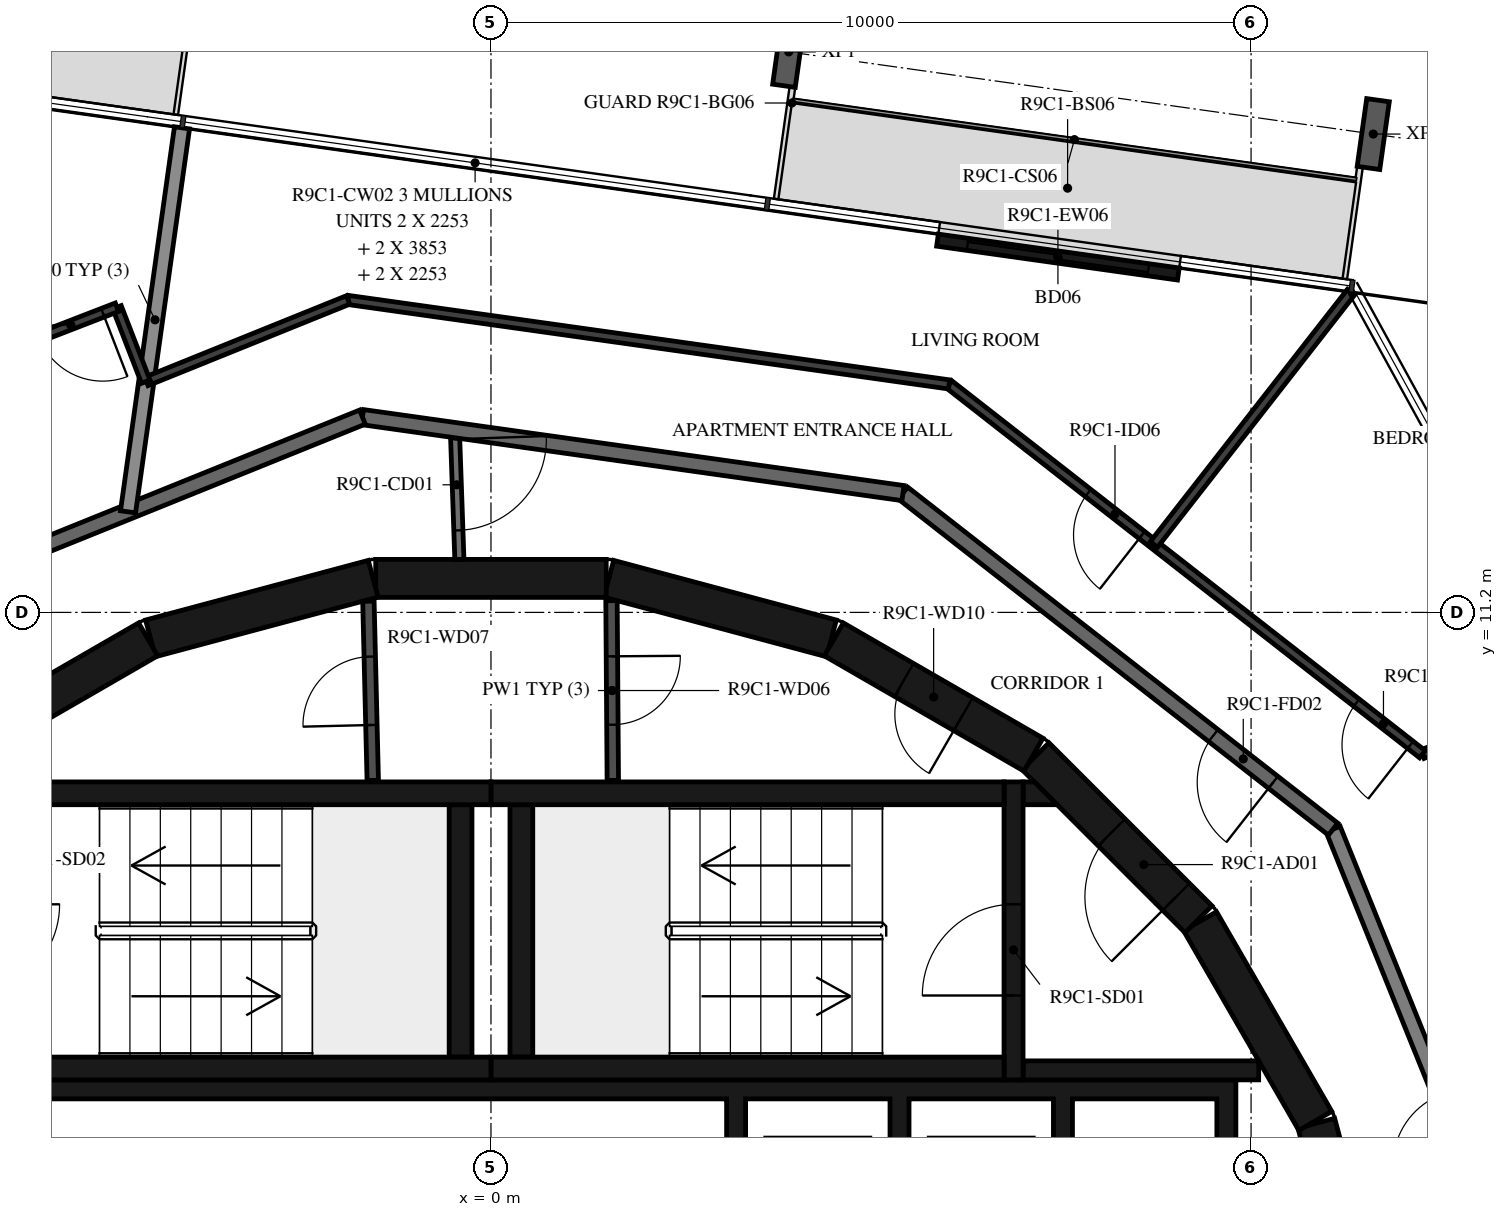
"""IFC4 building model, lengths in metres.
Left out: names, types, materials, properties, quantities, classifications, styles, units other than length and angle.
Written with IfcOpenShell. Run it as: python <this file> out.ifc"""

import sys

from ifc_helpers import new_model, si_unit, direction, frame, frame_2d, origin, origin_2d, place, context, subcontext, project, spatial, polyline, rectangle, i_section, outline, extrude, element, fill, save


model = new_model("IFC4")
c1 = context("Model", 3, precision=1e-05, world=origin(), true_north=direction((0.0, 1.0)))
c2 = subcontext(c1, "Body", "Model", "MODEL_VIEW")
j1 = project(units=[si_unit("LENGTHUNIT", "METRE"), si_unit("PLANEANGLEUNIT", "RADIAN")], contexts=[c1])
p1 = place(None, origin())
s1 = spatial("IfcSite", under=j1, at=p1, CompositionType="ELEMENT")
p2 = place(p1, origin())
s2 = spatial("IfcBuilding", under=s1, at=p2, CompositionType="ELEMENT")
p3 = place(p2, frame((0.0, 0.0, 357.5)))
s3 = spatial("IfcBuildingStorey", under=s2, at=p3, CompositionType="ELEMENT", Elevation=357.5)
for number, where, z_axis, x_axis in (
    (1, (11.607, 17.493, -0.38), (0.0, 0.0, 1.0), (0.99, -0.139, 0.0)),
    (2, (3.917, 18.574, -0.38), (0.0, 0.0, 1.0), (0.99, -0.139, 0.0)),
):
    element("IfcColumn", number, at=place(p3, frame(where, z_axis=z_axis, x_axis=x_axis)), inside=s3, PredefinedType="COLUMN", context=c2, shape_type="SweptSolid", body=[
        extrude(i_section(OverallWidth=0.3, OverallDepth=0.9, WebThickness=0.019, FlangeThickness=0.035, FilletRadius=0.03, at=origin_2d()), origin(), (0.0, 0.0, 1.0), 3.5),
    ])
p4 = place(p3, frame((9.043, 15.652, 0.0), z_axis=(0.0, 0.0, 1.0), x_axis=(-0.990270382149, 0.139156639217, 0.0)))
e3 = element("IfcWall", 3, at=p4, inside=s3, PredefinedType="STANDARD", context=c2, shape_type="SweptSolid", body=[
    extrude(rectangle(XDim=3.2, YDim=0.16, at=frame_2d((1.6, 0.0))), origin(), (0.0, 0.0, 1.0), 3.12),
])
p5 = place(p4, frame((0.4, 0.0, 0.0)))
e4 = element("IfcOpeningElement", 4, at=p5, cuts=e3, PredefinedType="OPENING", context=c2, shape_type="SweptSolid", body=[
    extrude(rectangle(XDim=2.4, YDim=2.4, at=frame_2d((1.2, 1.2))), frame((0.0, 0.09, 0.0), z_axis=(0.0, -1.0, 0.0), x_axis=(1.0, 0.0, 0.0)), (0.0, 0.0, 1.0), 0.18),
])
for number, where, z_axis, x_axis in (
    (5, (11.643, 1.55, 0.0), (0.0, 0.0, 1.0), (-0.259, 0.966, 0.0)),
    (6, (10.845, 4.51, 0.0), (0.0, 0.0, 1.0), (-0.5, 0.866, 0.0)),
):
    element("IfcWall", number, at=place(p3, frame(where, z_axis=z_axis, x_axis=x_axis)), inside=s3, PredefinedType="SHEAR", context=c2, shape_type="SweptSolid", body=[
        extrude(rectangle(XDim=3.033, YDim=0.5, at=frame_2d((1.516, 0.0))), origin(), (0.0, 0.0, 1.0), 3.12),
    ])
p6 = place(p3, frame((9.308, 7.164, 0.0), z_axis=(0.0, 0.0, 1.0), x_axis=(-0.707106781187, 0.707106781187, 0.0)))
e7 = element("IfcWall", 7, at=p6, inside=s3, PredefinedType="SHEAR", context=c2, shape_type="SweptSolid", body=[
    extrude(rectangle(XDim=3.032, YDim=0.5, at=frame_2d((1.516, 0.0))), origin(), (0.0, 0.0, 1.0), 3.12),
])
p7 = place(p6, frame((0.416, 0.0, 0.0)))
e8 = element("IfcOpeningElement", 8, at=p7, cuts=e7, PredefinedType="OPENING", context=c2, shape_type="SweptSolid", body=[
    extrude(rectangle(XDim=1.2, YDim=2.1, at=frame_2d((0.6, 1.05))), frame((0.0, 0.26, 0.0), z_axis=(0.0, -1.0, 0.0), x_axis=(1.0, 0.0, 0.0)), (0.0, 0.0, 1.0), 0.52),
])
p8 = place(p3, frame((7.137, 9.329, 0.0), z_axis=(0.0, 0.0, 1.0), x_axis=(-0.865975092491, 0.500087131594, 0.0)))
e9 = element("IfcWall", 9, at=p8, inside=s3, PredefinedType="SHEAR", context=c2, shape_type="SweptSolid", body=[
    extrude(rectangle(XDim=3.033, YDim=0.5, at=frame_2d((1.516, 0.0))), origin(), (0.0, 0.0, 1.0), 3.12),
])
p9 = place(p8, frame((1.066, 0.0, 0.0)))
e10 = element("IfcOpeningElement", 10, at=p9, cuts=e9, PredefinedType="OPENING", context=c2, shape_type="SweptSolid", body=[
    extrude(rectangle(XDim=0.9, YDim=2.1, at=frame_2d((0.45, 1.05))), frame((0.0, 0.26, 0.0), z_axis=(0.0, -1.0, 0.0), x_axis=(1.0, 0.0, 0.0)), (0.0, 0.0, 1.0), 0.52),
])
for number, where, z_axis, x_axis in (
    (11, (4.479, 10.858, 0.0), (0.0, 0.0, 1.0), (-0.966, 0.259, 0.0)),
    (12, (1.516, 11.647, 0.0), (0.0, 0.0, 1.0), (-1.0, 0.0, 0.0)),
    (13, (-1.55, 11.643, 0.0), (0.0, 0.0, 1.0), (-0.966, -0.259, 0.0)),
    (14, (-4.51, 10.845, 0.0), (0.0, 0.0, 1.0), (-0.866, -0.5, 0.0)),
):
    element("IfcWall", number, at=place(p3, frame(where, z_axis=z_axis, x_axis=x_axis)), inside=s3, PredefinedType="SHEAR", context=c2, shape_type="SweptSolid", body=[
        extrude(rectangle(XDim=3.033, YDim=0.5, at=frame_2d((1.516, 0.0))), origin(), (0.0, 0.0, 1.0), 3.12),
    ])
for number, where, z_axis, x_axis in (
    (15, (0.0, 5.2, 0.0), (0.0, 0.0, 1.0), (1.0, 0.0, 0.0)),
    (16, (0.0, 8.82, 0.0), (0.0, 0.0, 1.0), (1.0, 0.0, 0.0)),
):
    element("IfcWall", number, at=place(p3, frame(where, z_axis=z_axis, x_axis=x_axis)), inside=s3, PredefinedType="SHEAR", context=c2, shape_type="SweptSolid", body=[
        extrude(rectangle(XDim=6.75, YDim=0.3, at=frame_2d((3.375, 0.0))), origin(), (0.0, 0.0, 1.0), 3.12),
    ])
p10 = place(p3, frame((0.4, 5.35, 0.0), z_axis=(0.0, 0.0, 1.0), x_axis=(0.0, 1.0, 0.0)))
e17 = element("IfcWall", 17, at=p10, inside=s3, PredefinedType="SHEAR", context=c2, shape_type="SweptSolid", body=[
    extrude(rectangle(XDim=3.32, YDim=0.3, at=frame_2d((1.66, 0.0))), origin(), (0.0, 0.0, 1.0), 3.12),
])
p11 = place(p3, frame((6.875, 5.05, 0.0), z_axis=(0.0, 0.0, 1.0), x_axis=(0.0, 1.0, 0.0)))
e18 = element("IfcWall", 18, at=p11, inside=s3, PredefinedType="SHEAR", context=c2, shape_type="SweptSolid", body=[
    extrude(rectangle(XDim=3.92, YDim=0.25, at=frame_2d((1.96, 0.0))), origin(), (0.0, 0.0, 1.0), 3.12),
])
p12 = place(p11, frame((1.11, 0.0, 0.0)))
e19 = element("IfcOpeningElement", 19, at=p12, cuts=e18, PredefinedType="OPENING", context=c2, shape_type="SweptSolid", body=[
    extrude(rectangle(XDim=1.2, YDim=2.1, at=frame_2d((0.6, 1.05))), frame((0.0, 0.135, 0.0), z_axis=(0.0, -1.0, 0.0), x_axis=(1.0, 0.0, 0.0)), (0.0, 0.0, 1.0), 0.27),
])
p13 = place(p3, frame((7.0, 5.175, 0.0), z_axis=(0.0, 0.0, 1.0), x_axis=(1.0, 0.0, 0.0)))
e20 = element("IfcWall", 20, at=p13, inside=s3, PredefinedType="SHEAR", context=c2, shape_type="SweptSolid", body=[
    extrude(rectangle(XDim=3.1, YDim=0.25, at=frame_2d((1.55, 0.0))), origin(), (0.0, 0.0, 1.0), 3.12),
])
p14 = place(p3, origin())
e21 = element("IfcWall", 21, at=p14, inside=s3, PredefinedType="SHEAR", context=c2, shape_type="SweptSolid", body=[
    extrude(outline(polyline([(7.448, 8.67), (7.0, 8.67), (7.0, 8.97), (7.148, 8.97), (7.448, 8.67)])), origin(), (0.0, 0.0, 1.0), 3.12),
])
for number, where, z_axis, x_axis in (
    (22, (-6.75, 5.2, 0.0), (0.0, 0.0, 1.0), (1.0, 0.0, 0.0)),
    (23, (-6.75, 8.82, 0.0), (0.0, 0.0, 1.0), (1.0, 0.0, 0.0)),
):
    element("IfcWall", number, at=place(p3, frame(where, z_axis=z_axis, x_axis=x_axis)), inside=s3, PredefinedType="SHEAR", context=c2, shape_type="SweptSolid", body=[
        extrude(rectangle(XDim=6.75, YDim=0.3, at=frame_2d((3.375, 0.0))), origin(), (0.0, 0.0, 1.0), 3.12),
    ])
p15 = place(p3, frame((-0.4, 5.35, 0.0), z_axis=(0.0, 0.0, 1.0), x_axis=(0.0, 1.0, 0.0)))
e24 = element("IfcWall", 24, at=p15, inside=s3, PredefinedType="SHEAR", context=c2, shape_type="SweptSolid", body=[
    extrude(rectangle(XDim=3.32, YDim=0.3, at=frame_2d((1.66, 0.0))), origin(), (0.0, 0.0, 1.0), 3.12),
])
p16 = place(p3, origin())
e25 = element("IfcWall", 25, at=p16, inside=s3, PredefinedType="SHEAR", context=c2, shape_type="SweptSolid", body=[
    extrude(outline(polyline([(-9.8, 1.9), (-9.55, 1.9), (-9.55, 4.8), (3.1, 4.8), (3.1, 1.9), (3.35, 1.9), (3.35, 4.8), (5.25, 4.8), (5.25, 1.9), (5.5, 1.9), (5.5, 4.8), (7.4, 4.8), (7.4, 1.9), (7.65, 1.9), (7.65, 4.8), (9.55, 4.8), (9.55, 1.9), (9.8, 1.9), (9.8, 4.8), (9.8, 5.05), (-9.8, 5.05), (-9.8, 4.8), (-9.8, 1.9)])), origin(), (0.0, 0.0, 1.0), 3.12),
])
p17 = place(p3, frame((1.586, 11.354, 0.0), z_axis=(0.0, 0.0, 1.0), x_axis=(0.007227482881, -0.999973881405, 0.0)))
e26 = element("IfcWall", 26, at=p17, inside=s3, PredefinedType="PARTITIONING", context=c2, shape_type="SweptSolid", body=[
    extrude(rectangle(XDim=2.365, YDim=0.15, at=frame_2d((1.182, 0.0))), origin(), (0.0, 0.0, 1.0), 3.12),
])
p18 = place(p17, frame((0.732, 0.0, 0.0)))
e27 = element("IfcOpeningElement", 27, at=p18, cuts=e26, PredefinedType="OPENING", context=c2, shape_type="SweptSolid", body=[
    extrude(rectangle(XDim=0.9, YDim=2.1, at=frame_2d((0.45, 1.05))), frame((0.0, 0.085, 0.0), z_axis=(0.0, -1.0, 0.0), x_axis=(1.0, 0.0, 0.0)), (0.0, 0.0, 1.0), 0.17),
])
p19 = place(p3, frame((-1.555, 8.99, 0.0), z_axis=(0.0, 0.0, 1.0), x_axis=(-0.024125549686, 0.999708936567, 0.0)))
e28 = element("IfcWall", 28, at=p19, inside=s3, PredefinedType="PARTITIONING", context=c2, shape_type="SweptSolid", body=[
    extrude(rectangle(XDim=2.358, YDim=0.15, at=frame_2d((1.179, 0.0))), origin(), (0.0, 0.0, 1.0), 3.12),
])
p20 = place(p19, frame((0.729, 0.0, 0.0)))
e29 = element("IfcOpeningElement", 29, at=p20, cuts=e28, PredefinedType="OPENING", context=c2, shape_type="SweptSolid", body=[
    extrude(rectangle(XDim=0.9, YDim=2.1, at=frame_2d((0.45, 1.05))), frame((0.0, 0.085, 0.0), z_axis=(0.0, -1.0, 0.0), x_axis=(1.0, 0.0, 0.0)), (0.0, 0.0, 1.0), 0.17),
])
p21 = place(p3, frame((-0.475, 13.598, 0.0), z_axis=(0.0, 0.0, 1.0), x_axis=(0.034852521429, -0.999392466326, 0.0)))
e30 = element("IfcWall", 30, at=p21, inside=s3, PredefinedType="PARTITIONING", context=c2, shape_type="SweptSolid", body=[
    extrude(rectangle(XDim=1.702, YDim=0.12, at=frame_2d((0.851, 0.0))), origin(), (0.0, 0.0, 1.0), 3.12),
])
p22 = place(p21, frame((0.12, 0.0, 0.0)))
e31 = element("IfcOpeningElement", 31, at=p22, cuts=e30, PredefinedType="OPENING", context=c2, shape_type="SweptSolid", body=[
    extrude(rectangle(XDim=1.2, YDim=2.1, at=frame_2d((0.6, 1.05))), frame((0.0, 0.07, 0.0), z_axis=(0.0, -1.0, 0.0), x_axis=(1.0, 0.0, 0.0)), (0.0, 0.0, 1.0), 0.14),
])
p23 = place(p3, frame((13.769, 1.691, 0.0), z_axis=(0.0, 0.0, 1.0), x_axis=(-0.374618189599, 0.92717916932, 0.0)))
e32 = element("IfcWall", 32, at=p23, inside=s3, PredefinedType="STANDARD", context=c2, shape_type="SweptSolid", body=[
    extrude(rectangle(XDim=7.181, YDim=0.2, at=frame_2d((3.591, 0.0))), origin(), (0.0, 0.0, 1.0), 3.12),
])
p24 = place(p23, frame((2.41, 0.0, 0.0)))
e33 = element("IfcOpeningElement", 33, at=p24, cuts=e32, PredefinedType="OPENING", context=c2, shape_type="SweptSolid", body=[
    extrude(rectangle(XDim=1.0, YDim=2.1, at=frame_2d((0.5, 1.05))), frame((0.0, 0.11, 0.0), z_axis=(0.0, -1.0, 0.0), x_axis=(1.0, 0.0, 0.0)), (0.0, 0.0, 1.0), 0.22),
])
p25 = place(p3, frame((11.079, 8.349, 0.0), z_axis=(0.0, 0.0, 1.0), x_axis=(-0.78800478687, 0.615669112324, 0.0)))
e34 = element("IfcWall", 34, at=p25, inside=s3, PredefinedType="STANDARD", context=c2, shape_type="SweptSolid", body=[
    extrude(rectangle(XDim=7.181, YDim=0.2, at=frame_2d((3.591, 0.0))), origin(), (0.0, 0.0, 1.0), 3.12),
])
p26 = place(p25, frame((1.0, 0.0, 0.0)))
e35 = element("IfcOpeningElement", 35, at=p26, cuts=e34, PredefinedType="OPENING", context=c2, shape_type="SweptSolid", body=[
    extrude(rectangle(XDim=1.0, YDim=2.1, at=frame_2d((0.5, 1.05))), frame((0.0, 0.11, 0.0), z_axis=(0.0, -1.0, 0.0), x_axis=(1.0, 0.0, 0.0)), (0.0, 0.0, 1.0), 0.22),
])
p27 = place(p3, frame((5.42, 12.77, 0.0), z_axis=(0.0, 0.0, 1.0), x_axis=(-0.990270565508, 0.139155334385, 0.0)))
e36 = element("IfcWall", 36, at=p27, inside=s3, PredefinedType="STANDARD", context=c2, shape_type="SweptSolid", body=[
    extrude(rectangle(XDim=7.181, YDim=0.2, at=frame_2d((3.59, 0.0))), origin(), (0.0, 0.0, 1.0), 3.12),
])
p28 = place(p3, frame((-1.691, 13.769, 0.0), z_axis=(0.0, 0.0, 1.0), x_axis=(-0.92717916932, -0.374618189599, 0.0)))
e37 = element("IfcWall", 37, at=p28, inside=s3, PredefinedType="STANDARD", context=c2, shape_type="SweptSolid", body=[
    extrude(rectangle(XDim=7.181, YDim=0.2, at=frame_2d((3.591, 0.0))), origin(), (0.0, 0.0, 1.0), 3.12),
])
p29 = place(p3, frame((-4.065, 17.575, 0.0), z_axis=(0.0, 0.0, 1.0), x_axis=(-0.139163175955, -0.990269463559, 0.0)))
e38 = element("IfcWall", 38, at=p29, inside=s3, PredefinedType="STANDARD", context=c2, shape_type="SweptSolid", body=[
    extrude(rectangle(XDim=5.102, YDim=0.2, at=frame_2d((2.551, 0.0))), origin(), (0.0, 0.0, 1.0), 2.73),
])
p30 = place(p3, frame((13.32, 9.765, 0.0), z_axis=(0.0, 0.0, 1.0), x_axis=(-0.92716811739, -0.37464554194, 0.0)))
e39 = element("IfcWall", 39, at=p30, inside=s3, PredefinedType="PARTITIONING", context=c2, shape_type="SweptSolid", body=[
    extrude(rectangle(XDim=1.15, YDim=0.12, at=frame_2d((0.575, 0.0))), origin(), (0.0, 0.0, 1.0), 3.12),
])
p31 = place(p3, frame((12.254, 9.334, 0.0), z_axis=(0.0, 0.0, 1.0), x_axis=(-0.787994393996, 0.615682414098, 0.0)))
e40 = element("IfcWall", 40, at=p31, inside=s3, PredefinedType="PARTITIONING", context=c2, shape_type="SweptSolid", body=[
    extrude(rectangle(XDim=7.902, YDim=0.12, at=frame_2d((3.951, 0.0))), origin(), (0.0, 0.0, 1.0), 3.12),
])
p32 = place(p31, frame((0.2, 0.0, 0.0)))
e41 = element("IfcOpeningElement", 41, at=p32, cuts=e40, PredefinedType="OPENING", context=c2, shape_type="SweptSolid", body=[
    extrude(rectangle(XDim=0.9, YDim=2.1, at=frame_2d((0.45, 1.05))), frame((0.0, 0.07, 0.0), z_axis=(0.0, -1.0, 0.0), x_axis=(1.0, 0.0, 0.0)), (0.0, 0.0, 1.0), 0.14),
])
p33 = place(p31, frame((4.683, 0.0, 0.0)))
e42 = element("IfcOpeningElement", 42, at=p33, cuts=e40, PredefinedType="OPENING", context=c2, shape_type="SweptSolid", body=[
    extrude(rectangle(XDim=0.9, YDim=2.1, at=frame_2d((0.45, 1.05))), frame((0.0, 0.07, 0.0), z_axis=(0.0, -1.0, 0.0), x_axis=(1.0, 0.0, 0.0)), (0.0, 0.0, 1.0), 0.14),
])
p34 = place(p3, frame((6.027, 14.199, 0.0), z_axis=(0.0, 0.0, 1.0), x_axis=(-0.990271593532, 0.139148018469, 0.0)))
e43 = element("IfcWall", 43, at=p34, inside=s3, PredefinedType="PARTITIONING", context=c2, shape_type="SweptSolid", body=[
    extrude(rectangle(XDim=7.985, YDim=0.12, at=frame_2d((3.992, 0.0))), origin(), (0.0, 0.0, 1.0), 3.12),
])
p35 = place(p3, frame((-1.88, 15.311, 0.0), z_axis=(0.0, 0.0, 1.0), x_axis=(-0.927176894493, -0.374623819743, 0.0)))
e44 = element("IfcWall", 44, at=p35, inside=s3, PredefinedType="PARTITIONING", context=c2, shape_type="SweptSolid", body=[
    extrude(rectangle(XDim=2.862, YDim=0.12, at=frame_2d((1.431, 0.0))), origin(), (0.0, 0.0, 1.0), 3.12),
])
p36 = place(p3, frame((11.315, 15.414, 0.0), z_axis=(0.0, 0.0, 1.0), x_axis=(-0.615656413137, -0.788014708596, 0.0)))
e45 = element("IfcWall", 45, at=p36, inside=s3, PredefinedType="PARTITIONING", context=c2, shape_type="SweptSolid", body=[
    extrude(rectangle(XDim=4.213, YDim=0.12, at=frame_2d((2.106, 0.0))), origin(), (0.0, 0.0, 1.0), 3.12),
])
p37 = place(p3, frame((-4.542, 14.235, 0.0), z_axis=(0.0, 0.0, 1.0), x_axis=(-0.360785401119, 0.932648859078, 0.0)))
e46 = element("IfcWall", 46, at=p37, inside=s3, PredefinedType="PARTITIONING", context=c2, shape_type="SweptSolid", body=[
    extrude(rectangle(XDim=1.05, YDim=0.12, at=frame_2d((0.525, 0.0))), origin(), (0.0, 0.0, 1.0), 3.12),
])
p38 = place(p3, frame((-4.921, 15.215, 0.0), z_axis=(0.0, 0.0, 1.0), x_axis=(-0.93265541153, -0.360768462236, 0.0)))
e47 = element("IfcWall", 47, at=p38, inside=s3, PredefinedType="PARTITIONING", context=c2, shape_type="SweptSolid", body=[
    extrude(rectangle(XDim=1.7, YDim=0.12, at=frame_2d((0.85, 0.0))), origin(), (0.0, 0.0, 1.0), 3.12),
])
p39 = place(p38, frame((0.2, 0.0, 0.0)))
e48 = element("IfcOpeningElement", 48, at=p39, cuts=e47, PredefinedType="OPENING", context=c2, shape_type="SweptSolid", body=[
    extrude(rectangle(XDim=0.9, YDim=2.1, at=frame_2d((0.45, 1.05))), frame((0.0, 0.07, 0.0), z_axis=(0.0, -1.0, 0.0), x_axis=(1.0, 0.0, 0.0)), (0.0, 0.0, 1.0), 0.14),
])
p40 = place(p5, origin())
e49 = element("IfcDoor", 49, at=p40, inside=s3, OperationType="DOUBLE_DOOR_SLIDING", PredefinedType="DOOR", context=c2, shape_type="SweptSolid", body=[
    extrude(rectangle(XDim=2.4, YDim=2.4, at=frame_2d((1.2, 1.2))), frame((0.0, 0.025, 0.0), z_axis=(0.0, -1.0, 0.0), x_axis=(1.0, 0.0, 0.0)), (0.0, 0.0, 1.0), 0.05),
])
fill(e4, e49)
p41 = place(p12, origin())
e50 = element("IfcDoor", 50, at=p41, inside=s3, OperationType="SINGLE_SWING_LEFT", PredefinedType="DOOR", context=c2, shape_type="SweptSolid", body=[
    extrude(rectangle(XDim=1.2, YDim=2.1, at=frame_2d((0.6, 1.05))), frame((0.0, 0.025, 0.0), z_axis=(0.0, -1.0, 0.0), x_axis=(1.0, 0.0, 0.0)), (0.0, 0.0, 1.0), 0.05),
])
fill(e19, e50)
p42 = place(p7, origin())
e51 = element("IfcDoor", 51, at=p42, inside=s3, OperationType="SINGLE_SWING_RIGHT", PredefinedType="DOOR", context=c2, shape_type="SweptSolid", body=[
    extrude(rectangle(XDim=1.2, YDim=2.1, at=frame_2d((0.6, 1.05))), frame((0.0, 0.025, 0.0), z_axis=(0.0, -1.0, 0.0), x_axis=(1.0, 0.0, 0.0)), (0.0, 0.0, 1.0), 0.05),
])
fill(e8, e51)
p43 = place(p18, origin())
e52 = element("IfcDoor", 52, at=p43, inside=s3, OperationType="SINGLE_SWING_RIGHT", PredefinedType="DOOR", context=c2, shape_type="SweptSolid", body=[
    extrude(rectangle(XDim=0.9, YDim=2.1, at=frame_2d((0.45, 1.05))), frame((0.0, 0.025, 0.0), z_axis=(0.0, -1.0, 0.0), x_axis=(1.0, 0.0, 0.0)), (0.0, 0.0, 1.0), 0.05),
])
fill(e27, e52)
p44 = place(p20, origin())
e53 = element("IfcDoor", 53, at=p44, inside=s3, OperationType="SINGLE_SWING_LEFT", PredefinedType="DOOR", context=c2, shape_type="SweptSolid", body=[
    extrude(rectangle(XDim=0.9, YDim=2.1, at=frame_2d((0.45, 1.05))), frame((0.0, 0.025, 0.0), z_axis=(0.0, -1.0, 0.0), x_axis=(1.0, 0.0, 0.0)), (0.0, 0.0, 1.0), 0.05),
])
fill(e29, e53)
p45 = place(p9, origin())
e54 = element("IfcDoor", 54, at=p45, inside=s3, OperationType="SINGLE_SWING_RIGHT", PredefinedType="DOOR", context=c2, shape_type="SweptSolid", body=[
    extrude(rectangle(XDim=0.9, YDim=2.1, at=frame_2d((0.45, 1.05))), frame((0.0, 0.025, 0.0), z_axis=(0.0, -1.0, 0.0), x_axis=(1.0, 0.0, 0.0)), (0.0, 0.0, 1.0), 0.05),
])
fill(e10, e54)
p46 = place(p26, origin())
e55 = element("IfcDoor", 55, at=p46, inside=s3, OperationType="SINGLE_SWING_LEFT", PredefinedType="DOOR", context=c2, shape_type="SweptSolid", body=[
    extrude(rectangle(XDim=1.0, YDim=2.1, at=frame_2d((0.5, 1.05))), frame((0.0, 0.025, 0.0), z_axis=(0.0, -1.0, 0.0), x_axis=(1.0, 0.0, 0.0)), (0.0, 0.0, 1.0), 0.05),
])
fill(e35, e55)
p47 = place(p32, origin())
e56 = element("IfcDoor", 56, at=p47, inside=s3, OperationType="SINGLE_SWING_LEFT", PredefinedType="DOOR", context=c2, shape_type="SweptSolid", body=[
    extrude(rectangle(XDim=0.9, YDim=2.1, at=frame_2d((0.45, 1.05))), frame((0.0, 0.025, 0.0), z_axis=(0.0, -1.0, 0.0), x_axis=(1.0, 0.0, 0.0)), (0.0, 0.0, 1.0), 0.05),
])
fill(e41, e56)
p48 = place(p33, origin())
e57 = element("IfcDoor", 57, at=p48, inside=s3, OperationType="SINGLE_SWING_LEFT", PredefinedType="DOOR", context=c2, shape_type="SweptSolid", body=[
    extrude(rectangle(XDim=0.9, YDim=2.1, at=frame_2d((0.45, 1.05))), frame((0.0, 0.025, 0.0), z_axis=(0.0, -1.0, 0.0), x_axis=(1.0, 0.0, 0.0)), (0.0, 0.0, 1.0), 0.05),
])
fill(e42, e57)
p49 = place(p39, origin())
e58 = element("IfcDoor", 58, at=p49, inside=s3, OperationType="SINGLE_SWING_RIGHT", PredefinedType="DOOR", context=c2, shape_type="SweptSolid", body=[
    extrude(rectangle(XDim=0.9, YDim=2.1, at=frame_2d((0.45, 1.05))), frame((0.0, 0.025, 0.0), z_axis=(0.0, -1.0, 0.0), x_axis=(1.0, 0.0, 0.0)), (0.0, 0.0, 1.0), 0.05),
])
fill(e48, e58)
p50 = place(p22, origin())
e59 = element("IfcDoor", 59, at=p50, inside=s3, OperationType="DOUBLE_DOOR_SINGLE_SWING", PredefinedType="DOOR", context=c2, shape_type="SweptSolid", body=[
    extrude(rectangle(XDim=1.2, YDim=2.1, at=frame_2d((0.6, 1.05))), frame((0.0, 0.025, 0.0), z_axis=(0.0, -1.0, 0.0), x_axis=(1.0, 0.0, 0.0)), (0.0, 0.0, 1.0), 0.05),
])
fill(e31, e59)
save(model, sys.argv[1])
